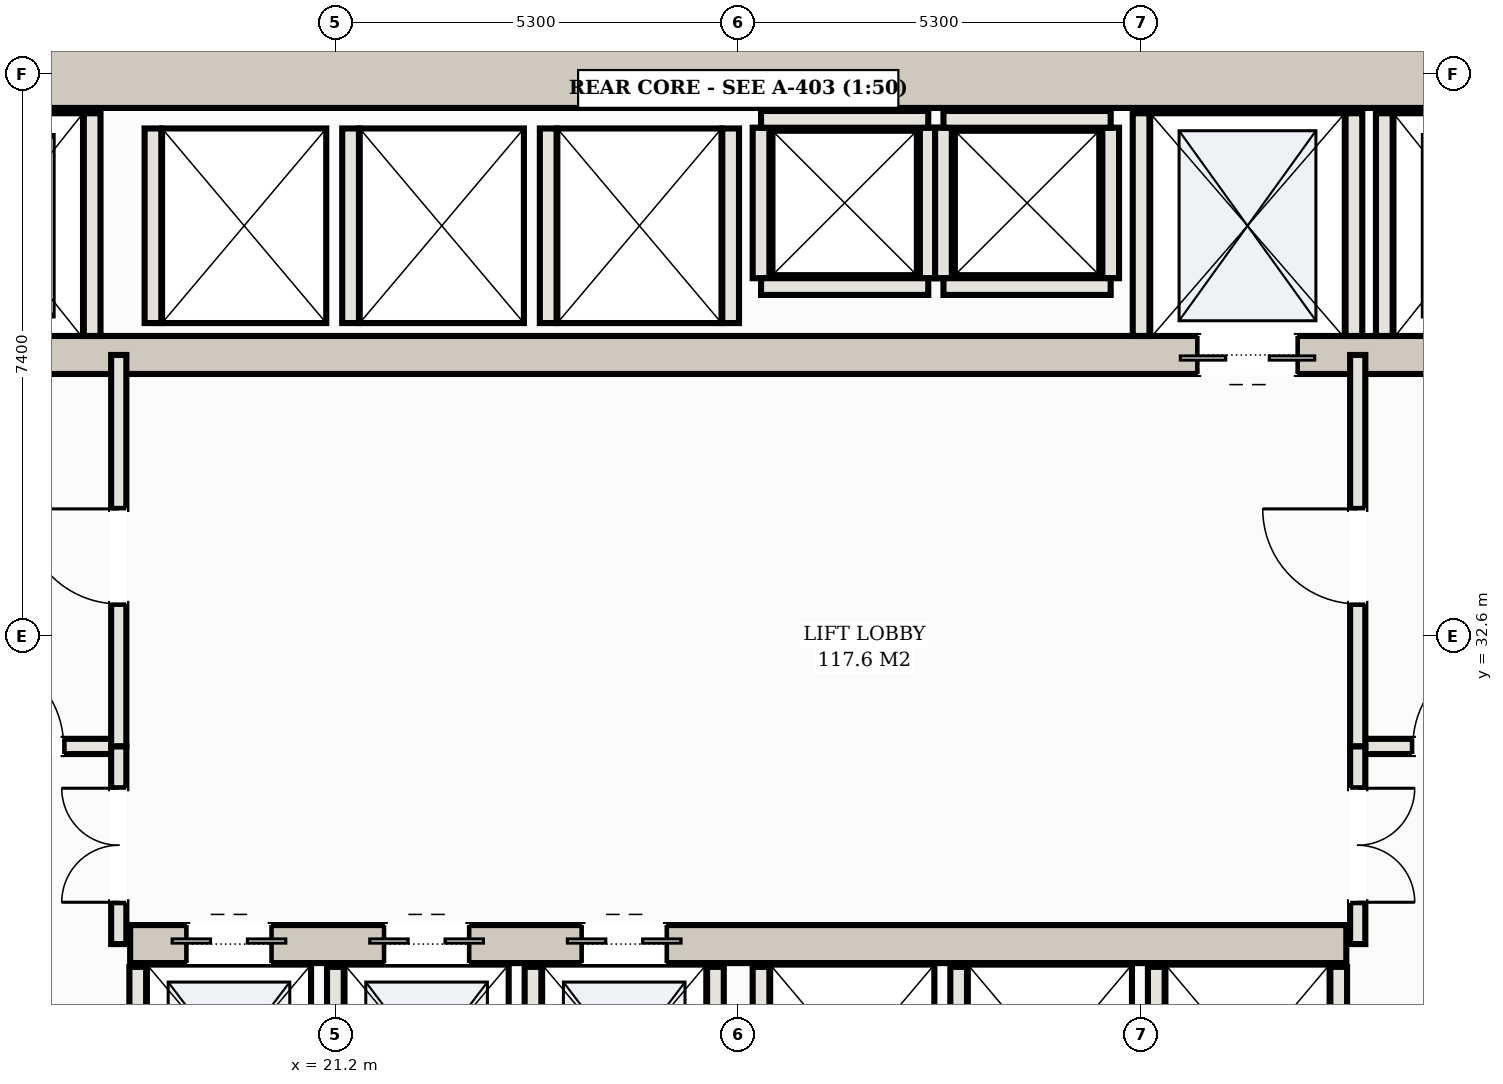
"""IFC4 building model, lengths in metres.
Left out: names, types, materials, properties, quantities, classifications, styles, units other than length and angle.
Written with IfcOpenShell. Run it as: python <this file> out.ifc"""

import sys

from ifc_helpers import new_model, si_unit, direction, frame, frame_2d, origin, place, context, subcontext, project, spatial, rectangle, extrude, element, fill, save


model = new_model("IFC4")
c1 = context("Model", 3, precision=1e-05, world=origin(), true_north=direction((0.0, 1.0)))
c2 = subcontext(c1, "Body", "Model", "MODEL_VIEW")
j1 = project(units=[si_unit("LENGTHUNIT", "METRE"), si_unit("PLANEANGLEUNIT", "RADIAN")], contexts=[c1])
p1 = place(None, origin())
s1 = spatial("IfcSite", under=j1, at=p1, CompositionType="ELEMENT")
p2 = place(p1, origin())
s2 = spatial("IfcBuilding", under=s1, at=p2, CompositionType="ELEMENT")
p3 = place(p2, frame((0.0, 0.0, 19.0)))
s3 = spatial("IfcBuildingStorey", under=s2, at=p3, CompositionType="ELEMENT", Elevation=19.0)
p4 = place(p3, frame((10.15, 40.0, 0.0), z_axis=(0.0, 0.0, 1.0), x_axis=(1.0, 0.0, 0.0)))
e1 = element("IfcWall", 1, at=p4, inside=s3, PredefinedType="SHEAR", context=c2, shape_type="SweptSolid", body=[
    extrude(rectangle(XDim=32.7, YDim=0.9, at=frame_2d((16.35, 0.0))), origin(), (0.0, 0.0, 1.0), 4.86),
])
p5 = place(p3, frame((15.5, 36.3, 0.0), z_axis=(0.0, 0.0, 1.0), x_axis=(1.0, 0.0, 0.0)))
e2 = element("IfcWall", 2, at=p5, inside=s3, PredefinedType="SHEAR", context=c2, shape_type="SweptSolid", body=[
    extrude(rectangle(XDim=22.0, YDim=0.5, at=frame_2d((11.0, 0.0))), origin(), (0.0, 0.0, 1.0), 4.86),
])
p6 = place(p5, frame((0.65, 0.0, 0.0)))
e3 = element("IfcOpeningElement", 3, at=p6, cuts=e2, PredefinedType="OPENING", context=c2, shape_type="SweptSolid", body=[
    extrude(rectangle(XDim=1.1, YDim=2.15, at=frame_2d((0.55, 1.075))), frame((0.0, 0.26, 0.0), z_axis=(0.0, -1.0, 0.0), x_axis=(1.0, 0.0, 0.0)), (0.0, 0.0, 1.0), 0.52),
])
p7 = place(p5, frame((20.25, 0.0, 0.0)))
e4 = element("IfcOpeningElement", 4, at=p7, cuts=e2, PredefinedType="OPENING", context=c2, shape_type="SweptSolid", body=[
    extrude(rectangle(XDim=1.1, YDim=2.15, at=frame_2d((0.55, 1.075))), frame((0.0, 0.26, 0.0), z_axis=(0.0, -1.0, 0.0), x_axis=(1.0, 0.0, 0.0)), (0.0, 0.0, 1.0), 0.52),
])
p8 = place(p5, frame((17.05, 0.0, 0.0)))
e5 = element("IfcOpeningElement", 5, at=p8, cuts=e2, PredefinedType="OPENING", context=c2, shape_type="SweptSolid", body=[
    extrude(rectangle(XDim=1.3, YDim=2.2, at=frame_2d((0.65, 1.1))), frame((0.0, 0.26, 0.0), z_axis=(0.0, -1.0, 0.0), x_axis=(1.0, 0.0, 0.0)), (0.0, 0.0, 1.0), 0.52),
])
p9 = place(p3, frame((18.5, 28.55, 0.0), z_axis=(0.0, 0.0, 1.0), x_axis=(1.0, 0.0, 0.0)))
e6 = element("IfcWall", 6, at=p9, inside=s3, PredefinedType="SHEAR", context=c2, shape_type="SweptSolid", body=[
    extrude(rectangle(XDim=16.0, YDim=0.5, at=frame_2d((8.0, 0.0))), origin(), (0.0, 0.0, 1.0), 4.86),
])
p10 = place(p9, frame((0.75, 0.0, 0.0)))
e7 = element("IfcOpeningElement", 7, at=p10, cuts=e6, PredefinedType="OPENING", context=c2, shape_type="SweptSolid", body=[
    extrude(rectangle(XDim=1.1, YDim=2.15, at=frame_2d((0.55, 1.075))), frame((0.0, 0.26, 0.0), z_axis=(0.0, -1.0, 0.0), x_axis=(1.0, 0.0, 0.0)), (0.0, 0.0, 1.0), 0.52),
])
p11 = place(p9, frame((3.35, 0.0, 0.0)))
e8 = element("IfcOpeningElement", 8, at=p11, cuts=e6, PredefinedType="OPENING", context=c2, shape_type="SweptSolid", body=[
    extrude(rectangle(XDim=1.1, YDim=2.15, at=frame_2d((0.55, 1.075))), frame((0.0, 0.26, 0.0), z_axis=(0.0, -1.0, 0.0), x_axis=(1.0, 0.0, 0.0)), (0.0, 0.0, 1.0), 0.52),
])
p12 = place(p9, frame((5.95, 0.0, 0.0)))
e9 = element("IfcOpeningElement", 9, at=p12, cuts=e6, PredefinedType="OPENING", context=c2, shape_type="SweptSolid", body=[
    extrude(rectangle(XDim=1.1, YDim=2.15, at=frame_2d((0.55, 1.075))), frame((0.0, 0.26, 0.0), z_axis=(0.0, -1.0, 0.0), x_axis=(1.0, 0.0, 0.0)), (0.0, 0.0, 1.0), 0.52),
])
for number, where, z_axis, x_axis in (
    (10, (18.0, 36.55, 0.0), (0.0, 0.0, 1.0), (0.0, 1.0, 0.0)),
    (11, (35.0, 36.55, 0.0), (0.0, 0.0, 1.0), (0.0, 1.0, 0.0)),
    (12, (31.8, 36.55, 0.0), (0.0, 0.0, 1.0), (0.0, 1.0, 0.0)),
    (13, (34.6, 36.55, 0.0), (0.0, 0.0, 1.0), (0.0, 1.0, 0.0)),
):
    element("IfcWall", number, at=place(p3, frame(where, z_axis=z_axis, x_axis=x_axis)), inside=s3, PredefinedType="SOLIDWALL", context=c2, shape_type="SweptSolid", body=[
        extrude(rectangle(XDim=2.93, YDim=0.22, at=frame_2d((1.465, 0.0))), origin(), (0.0, 0.0, 1.0), 4.86),
    ])
for number, where, z_axis, x_axis in (
    (14, (18.6, 25.72, 0.0), (0.0, 0.0, 1.0), (0.0, 1.0, 0.0)),
    (15, (21.2, 25.72, 0.0), (0.0, 0.0, 1.0), (0.0, 1.0, 0.0)),
    (16, (23.8, 25.72, 0.0), (0.0, 0.0, 1.0), (0.0, 1.0, 0.0)),
    (17, (26.2, 25.72, 0.0), (0.0, 0.0, 1.0), (0.0, 1.0, 0.0)),
    (18, (26.8, 25.72, 0.0), (0.0, 0.0, 1.0), (0.0, 1.0, 0.0)),
    (19, (29.4, 25.72, 0.0), (0.0, 0.0, 1.0), (0.0, 1.0, 0.0)),
    (20, (32.0, 25.72, 0.0), (0.0, 0.0, 1.0), (0.0, 1.0, 0.0)),
    (21, (34.4, 25.72, 0.0), (0.0, 0.0, 1.0), (0.0, 1.0, 0.0)),
):
    element("IfcWall", number, at=place(p3, frame(where, z_axis=z_axis, x_axis=x_axis)), inside=s3, PredefinedType="SOLIDWALL", context=c2, shape_type="SweptSolid", body=[
        extrude(rectangle(XDim=2.53, YDim=0.22, at=frame_2d((1.265, 0.0))), origin(), (0.0, 0.0, 1.0), 4.86),
    ])
for number, where, z_axis, x_axis in (
    (22, (18.8, 36.72, 0.0), (0.0, 0.0, 1.0), (0.0, 1.0, 0.0)),
    (23, (21.4, 36.72, 0.0), (0.0, 0.0, 1.0), (0.0, 1.0, 0.0)),
    (24, (24.0, 36.72, 0.0), (0.0, 0.0, 1.0), (0.0, 1.0, 0.0)),
    (25, (26.4, 36.72, 0.0), (0.0, 0.0, 1.0), (0.0, 1.0, 0.0)),
):
    element("IfcWall", number, at=place(p3, frame(where, z_axis=z_axis, x_axis=x_axis)), inside=s3, PredefinedType="SOLIDWALL", context=c2, shape_type="SweptSolid", body=[
        extrude(rectangle(XDim=2.56, YDim=0.22, at=frame_2d((1.28, 0.0))), origin(), (0.0, 0.0, 1.0), 4.86),
    ])
for number, where, z_axis, x_axis in (
    (26, (26.8, 37.31, 0.0), (0.0, 0.0, 1.0), (0.0, 1.0, 0.0)),
    (27, (29.0, 37.31, 0.0), (0.0, 0.0, 1.0), (0.0, 1.0, 0.0)),
):
    element("IfcWall", number, at=place(p3, frame(where, z_axis=z_axis, x_axis=x_axis)), inside=s3, PredefinedType="SOLIDWALL", context=c2, shape_type="SweptSolid", body=[
        extrude(rectangle(XDim=1.98, YDim=0.22, at=frame_2d((0.99, 0.0))), origin(), (0.0, 0.0, 1.0), 4.86),
    ])
for number, where, z_axis, x_axis in (
    (28, (26.8, 39.4, 0.0), (0.0, 0.0, 1.0), (1.0, 0.0, 0.0)),
    (29, (26.8, 37.2, 0.0), (0.0, 0.0, 1.0), (1.0, 0.0, 0.0)),
):
    element("IfcWall", number, at=place(p3, frame(where, z_axis=z_axis, x_axis=x_axis)), inside=s3, PredefinedType="SOLIDWALL", context=c2, shape_type="SweptSolid", body=[
        extrude(rectangle(XDim=2.2, YDim=0.22, at=frame_2d((1.1, 0.0))), origin(), (0.0, 0.0, 1.0), 4.86),
    ])
for number, where, z_axis, x_axis in (
    (30, (29.2, 37.31, 0.0), (0.0, 0.0, 1.0), (0.0, 1.0, 0.0)),
    (31, (31.4, 37.31, 0.0), (0.0, 0.0, 1.0), (0.0, 1.0, 0.0)),
):
    element("IfcWall", number, at=place(p3, frame(where, z_axis=z_axis, x_axis=x_axis)), inside=s3, PredefinedType="SOLIDWALL", context=c2, shape_type="SweptSolid", body=[
        extrude(rectangle(XDim=1.98, YDim=0.22, at=frame_2d((0.99, 0.0))), origin(), (0.0, 0.0, 1.0), 4.86),
    ])
for number, where, z_axis, x_axis in (
    (32, (29.2, 39.4, 0.0), (0.0, 0.0, 1.0), (1.0, 0.0, 0.0)),
    (33, (29.2, 37.2, 0.0), (0.0, 0.0, 1.0), (1.0, 0.0, 0.0)),
):
    element("IfcWall", number, at=place(p3, frame(where, z_axis=z_axis, x_axis=x_axis)), inside=s3, PredefinedType="SOLIDWALL", context=c2, shape_type="SweptSolid", body=[
        extrude(rectangle(XDim=2.2, YDim=0.22, at=frame_2d((1.1, 0.0))), origin(), (0.0, 0.0, 1.0), 4.86),
    ])
p13 = place(p3, frame((15.1, 31.15, 0.0), z_axis=(0.0, 0.0, 1.0), x_axis=(1.0, 0.0, 0.0)))
e34 = element("IfcWall", 34, at=p13, inside=s3, PredefinedType="PARTITIONING", context=c2, shape_type="SweptSolid", body=[
    extrude(rectangle(XDim=3.25, YDim=0.2, at=frame_2d((1.625, 0.0))), origin(), (0.0, 0.0, 1.0), 4.86),
])
p14 = place(p13, frame((1.275, 0.0, 0.0)))
e35 = element("IfcOpeningElement", 35, at=p14, cuts=e34, PredefinedType="OPENING", context=c2, shape_type="SweptSolid", body=[
    extrude(rectangle(XDim=1.25, YDim=2.2, at=frame_2d((0.625, 1.1))), frame((0.0, 0.11, 0.0), z_axis=(0.0, -1.0, 0.0), x_axis=(1.0, 0.0, 0.0)), (0.0, 0.0, 1.0), 0.22),
])
p15 = place(p3, frame((18.35, 31.15, 0.0), z_axis=(0.0, 0.0, 1.0), x_axis=(0.0, 1.0, 0.0)))
e36 = element("IfcWall", 36, at=p15, inside=s3, PredefinedType="PARTITIONING", context=c2, shape_type="SweptSolid", body=[
    extrude(rectangle(XDim=5.15, YDim=0.2, at=frame_2d((2.575, 0.0))), origin(), (0.0, 0.0, 1.0), 4.86),
])
p16 = place(p15, frame((1.875, 0.0, 0.0)))
e37 = element("IfcOpeningElement", 37, at=p16, cuts=e36, PredefinedType="OPENING", context=c2, shape_type="SweptSolid", body=[
    extrude(rectangle(XDim=1.25, YDim=2.2, at=frame_2d((0.625, 1.1))), frame((0.0, 0.11, 0.0), z_axis=(0.0, -1.0, 0.0), x_axis=(1.0, 0.0, 0.0)), (0.0, 0.0, 1.0), 0.22),
])
p17 = place(p3, frame((34.65, 31.15, 0.0), z_axis=(0.0, 0.0, 1.0), x_axis=(1.0, 0.0, 0.0)))
e38 = element("IfcWall", 38, at=p17, inside=s3, PredefinedType="PARTITIONING", context=c2, shape_type="SweptSolid", body=[
    extrude(rectangle(XDim=3.25, YDim=0.2, at=frame_2d((1.625, 0.0))), origin(), (0.0, 0.0, 1.0), 4.86),
])
p18 = place(p17, frame((0.725, 0.0, 0.0)))
e39 = element("IfcOpeningElement", 39, at=p18, cuts=e38, PredefinedType="OPENING", context=c2, shape_type="SweptSolid", body=[
    extrude(rectangle(XDim=1.25, YDim=2.2, at=frame_2d((0.625, 1.1))), frame((0.0, 0.11, 0.0), z_axis=(0.0, -1.0, 0.0), x_axis=(1.0, 0.0, 0.0)), (0.0, 0.0, 1.0), 0.22),
])
p19 = place(p3, frame((34.65, 31.15, 0.0), z_axis=(0.0, 0.0, 1.0), x_axis=(0.0, 1.0, 0.0)))
e40 = element("IfcWall", 40, at=p19, inside=s3, PredefinedType="PARTITIONING", context=c2, shape_type="SweptSolid", body=[
    extrude(rectangle(XDim=5.15, YDim=0.2, at=frame_2d((2.575, 0.0))), origin(), (0.0, 0.0, 1.0), 4.86),
])
p20 = place(p19, frame((1.875, 0.0, 0.0)))
e41 = element("IfcOpeningElement", 41, at=p20, cuts=e40, PredefinedType="OPENING", context=c2, shape_type="SweptSolid", body=[
    extrude(rectangle(XDim=1.25, YDim=2.2, at=frame_2d((0.625, 1.1))), frame((0.0, 0.11, 0.0), z_axis=(0.0, -1.0, 0.0), x_axis=(1.0, 0.0, 0.0)), (0.0, 0.0, 1.0), 0.22),
])
p21 = place(p3, frame((18.35, 28.55, 0.0), z_axis=(0.0, 0.0, 1.0), x_axis=(0.0, 1.0, 0.0)))
e42 = element("IfcWall", 42, at=p21, inside=s3, PredefinedType="PARTITIONING", context=c2, shape_type="SweptSolid", body=[
    extrude(rectangle(XDim=2.6, YDim=0.2, at=frame_2d((1.3, 0.0))), origin(), (0.0, 0.0, 1.0), 4.86),
])
p22 = place(p21, frame((0.55, 0.0, 0.0)))
e43 = element("IfcOpeningElement", 43, at=p22, cuts=e42, PredefinedType="OPENING", context=c2, shape_type="SweptSolid", body=[
    extrude(rectangle(XDim=1.5, YDim=2.25, at=frame_2d((0.75, 1.125))), frame((0.0, 0.11, 0.0), z_axis=(0.0, -1.0, 0.0), x_axis=(1.0, 0.0, 0.0)), (0.0, 0.0, 1.0), 0.22),
])
p23 = place(p3, frame((34.65, 28.55, 0.0), z_axis=(0.0, 0.0, 1.0), x_axis=(0.0, 1.0, 0.0)))
e44 = element("IfcWall", 44, at=p23, inside=s3, PredefinedType="PARTITIONING", context=c2, shape_type="SweptSolid", body=[
    extrude(rectangle(XDim=2.6, YDim=0.2, at=frame_2d((1.3, 0.0))), origin(), (0.0, 0.0, 1.0), 4.86),
])
p24 = place(p23, frame((0.55, 0.0, 0.0)))
e45 = element("IfcOpeningElement", 45, at=p24, cuts=e44, PredefinedType="OPENING", context=c2, shape_type="SweptSolid", body=[
    extrude(rectangle(XDim=1.5, YDim=2.25, at=frame_2d((0.75, 1.125))), frame((0.0, 0.11, 0.0), z_axis=(0.0, -1.0, 0.0), x_axis=(1.0, 0.0, 0.0)), (0.0, 0.0, 1.0), 0.22),
])
p25 = place(p8, frame((1.3, 0.0, 0.0), z_axis=(0.0, 0.0, 1.0), x_axis=(-1.0, 0.0, 0.0)))
e46 = element("IfcDoor", 46, at=p25, inside=s3, OperationType="DOUBLE_DOOR_SLIDING", PredefinedType="DOOR", context=c2, shape_type="SweptSolid", body=[
    extrude(rectangle(XDim=1.3, YDim=2.2, at=frame_2d((0.65, 1.1))), frame((0.0, 0.025, 0.0), z_axis=(0.0, -1.0, 0.0), x_axis=(1.0, 0.0, 0.0)), (0.0, 0.0, 1.0), 0.05),
])
fill(e5, e46)
p26 = place(p10, origin())
e47 = element("IfcDoor", 47, at=p26, inside=s3, OperationType="DOUBLE_DOOR_SLIDING", PredefinedType="DOOR", context=c2, shape_type="SweptSolid", body=[
    extrude(rectangle(XDim=1.1, YDim=2.15, at=frame_2d((0.55, 1.075))), frame((0.0, 0.025, 0.0), z_axis=(0.0, -1.0, 0.0), x_axis=(1.0, 0.0, 0.0)), (0.0, 0.0, 1.0), 0.05),
])
fill(e7, e47)
p27 = place(p11, origin())
e48 = element("IfcDoor", 48, at=p27, inside=s3, OperationType="DOUBLE_DOOR_SLIDING", PredefinedType="DOOR", context=c2, shape_type="SweptSolid", body=[
    extrude(rectangle(XDim=1.1, YDim=2.15, at=frame_2d((0.55, 1.075))), frame((0.0, 0.025, 0.0), z_axis=(0.0, -1.0, 0.0), x_axis=(1.0, 0.0, 0.0)), (0.0, 0.0, 1.0), 0.05),
])
fill(e8, e48)
p28 = place(p12, origin())
e49 = element("IfcDoor", 49, at=p28, inside=s3, OperationType="DOUBLE_DOOR_SLIDING", PredefinedType="DOOR", context=c2, shape_type="SweptSolid", body=[
    extrude(rectangle(XDim=1.1, YDim=2.15, at=frame_2d((0.55, 1.075))), frame((0.0, 0.025, 0.0), z_axis=(0.0, -1.0, 0.0), x_axis=(1.0, 0.0, 0.0)), (0.0, 0.0, 1.0), 0.05),
])
fill(e9, e49)
p29 = place(p14, origin())
e50 = element("IfcDoor", 50, at=p29, inside=s3, OperationType="SINGLE_SWING_LEFT", PredefinedType="DOOR", context=c2, shape_type="SweptSolid", body=[
    extrude(rectangle(XDim=1.25, YDim=2.2, at=frame_2d((0.625, 1.1))), frame((0.0, 0.025, 0.0), z_axis=(0.0, -1.0, 0.0), x_axis=(1.0, 0.0, 0.0)), (0.0, 0.0, 1.0), 0.05),
])
fill(e35, e50)
p30 = place(p16, origin())
e51 = element("IfcDoor", 51, at=p30, inside=s3, OperationType="SINGLE_SWING_RIGHT", PredefinedType="DOOR", context=c2, shape_type="SweptSolid", body=[
    extrude(rectangle(XDim=1.25, YDim=2.2, at=frame_2d((0.625, 1.1))), frame((0.0, 0.025, 0.0), z_axis=(0.0, -1.0, 0.0), x_axis=(1.0, 0.0, 0.0)), (0.0, 0.0, 1.0), 0.05),
])
fill(e37, e51)
p31 = place(p18, origin())
e52 = element("IfcDoor", 52, at=p31, inside=s3, OperationType="SINGLE_SWING_RIGHT", PredefinedType="DOOR", context=c2, shape_type="SweptSolid", body=[
    extrude(rectangle(XDim=1.25, YDim=2.2, at=frame_2d((0.625, 1.1))), frame((0.0, 0.025, 0.0), z_axis=(0.0, -1.0, 0.0), x_axis=(1.0, 0.0, 0.0)), (0.0, 0.0, 1.0), 0.05),
])
fill(e39, e52)
p32 = place(p20, origin())
e53 = element("IfcDoor", 53, at=p32, inside=s3, OperationType="SINGLE_SWING_RIGHT", PredefinedType="DOOR", context=c2, shape_type="SweptSolid", body=[
    extrude(rectangle(XDim=1.25, YDim=2.2, at=frame_2d((0.625, 1.1))), frame((0.0, 0.025, 0.0), z_axis=(0.0, -1.0, 0.0), x_axis=(1.0, 0.0, 0.0)), (0.0, 0.0, 1.0), 0.05),
])
fill(e41, e53)
p33 = place(p22, origin())
e54 = element("IfcDoor", 54, at=p33, inside=s3, OperationType="DOUBLE_DOOR_SINGLE_SWING", PredefinedType="DOOR", context=c2, shape_type="SweptSolid", body=[
    extrude(rectangle(XDim=1.5, YDim=2.25, at=frame_2d((0.75, 1.125))), frame((0.0, 0.025, 0.0), z_axis=(0.0, -1.0, 0.0), x_axis=(1.0, 0.0, 0.0)), (0.0, 0.0, 1.0), 0.05),
])
fill(e43, e54)
p34 = place(p24, frame((1.5, 0.0, 0.0), z_axis=(0.0, 0.0, 1.0), x_axis=(-1.0, 0.0, 0.0)))
e55 = element("IfcDoor", 55, at=p34, inside=s3, OperationType="DOUBLE_DOOR_SINGLE_SWING", PredefinedType="DOOR", context=c2, shape_type="SweptSolid", body=[
    extrude(rectangle(XDim=1.5, YDim=2.25, at=frame_2d((0.75, 1.125))), frame((0.0, 0.025, 0.0), z_axis=(0.0, -1.0, 0.0), x_axis=(1.0, 0.0, 0.0)), (0.0, 0.0, 1.0), 0.05),
])
fill(e45, e55)
save(model, sys.argv[1])
